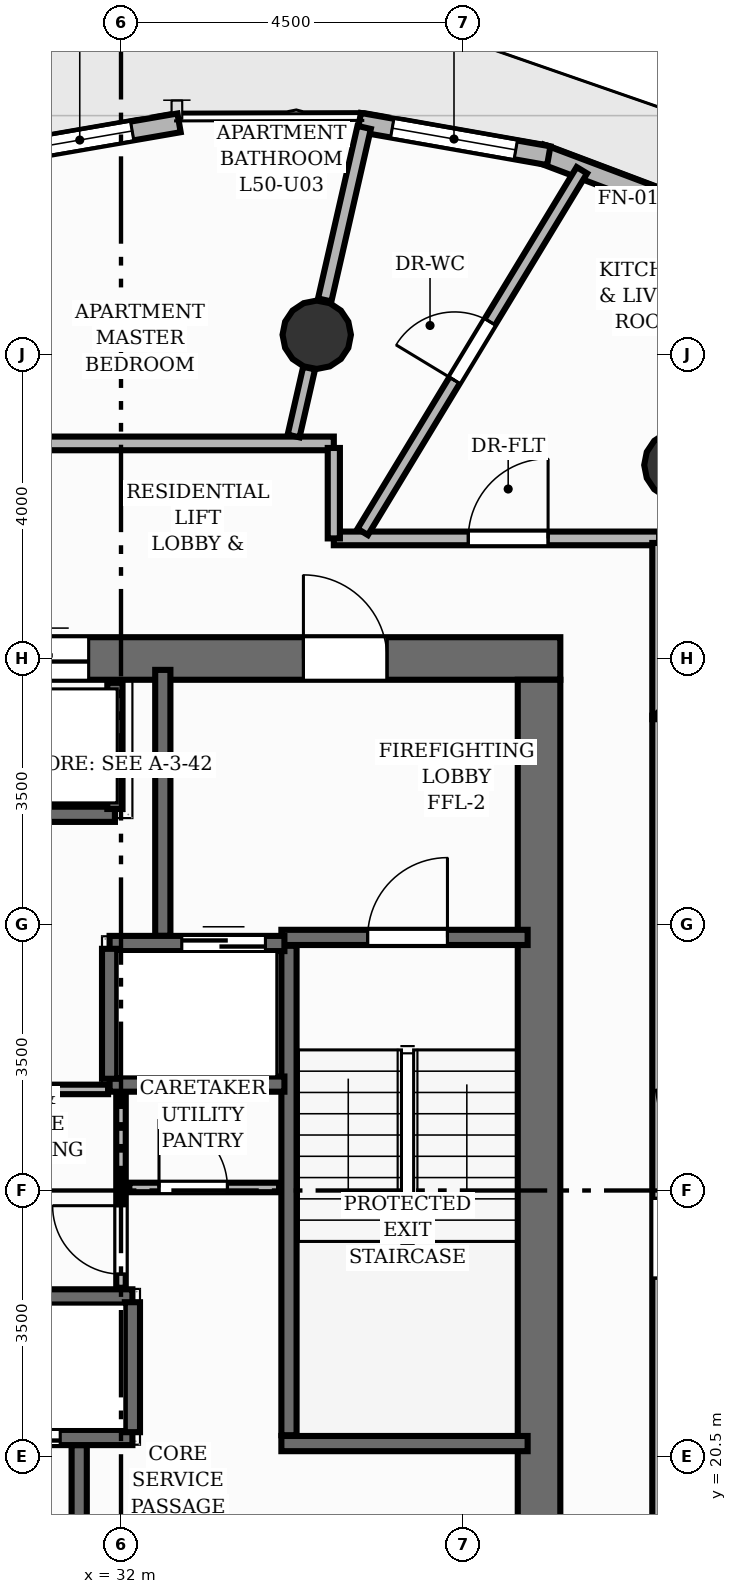
"""IFC4 building model, lengths in metres.
Left out: names, types, materials, properties, quantities, classifications, styles, units other than length and angle.
Written with IfcOpenShell. Run it as: python <this file> out.ifc"""

import sys

from ifc_helpers import new_model, si_unit, direction, frame, frame_2d, origin, origin_2d, place, context, subcontext, project, spatial, rectangle, circle, extrude, element, fill, save


model = new_model("IFC4")
c1 = context("Model", 3, precision=1e-05, world=origin(), true_north=direction((0.0, 1.0)))
c2 = subcontext(c1, "Body", "Model", "MODEL_VIEW")
j1 = project(units=[si_unit("LENGTHUNIT", "METRE"), si_unit("PLANEANGLEUNIT", "RADIAN")], contexts=[c1])
p1 = place(None, origin())
s1 = spatial("IfcSite", under=j1, at=p1, CompositionType="ELEMENT")
p2 = place(p1, origin())
s2 = spatial("IfcBuilding", under=s1, at=p2, CompositionType="ELEMENT")
p3 = place(p2, frame((0.0, 0.0, 169.44)))
s3 = spatial("IfcBuildingStorey", under=s2, at=p3, CompositionType="ELEMENT", Elevation=169.44)
p4 = place(p3, frame((26.22, 31.0, 0.0), z_axis=(0.0, 0.0, 1.0), x_axis=(1.0, 0.0, 0.0)))
e1 = element("IfcWall", 1, at=p4, inside=s3, PredefinedType="SHEAR", context=c2, shape_type="SweptSolid", body=[
    extrude(rectangle(XDim=11.56, YDim=0.56, at=frame_2d((5.78, 0.0))), origin(), (0.0, 0.0, 1.0), 3.2),
])
p5 = place(p4, frame((8.18, 0.0, 0.0)))
e2 = element("IfcOpeningElement", 2, at=p5, cuts=e1, PredefinedType="OPENING", context=c2, shape_type="SweptSolid", body=[
    extrude(rectangle(XDim=1.1, YDim=2.15, at=frame_2d((0.55, 1.075))), frame((0.0, 0.29, 0.0), z_axis=(0.0, -1.0, 0.0), x_axis=(1.0, 0.0, 0.0)), (0.0, 0.0, 1.0), 0.58),
])
p6 = place(p4, frame((0.805, 0.0, 0.0)))
e3 = element("IfcOpeningElement", 3, at=p6, cuts=e1, PredefinedType="OPENING", context=c2, shape_type="SweptSolid", body=[
    extrude(rectangle(XDim=1.05, YDim=2.15, at=frame_2d((0.525, 1.075))), frame((0.0, 0.29, 0.0), z_axis=(0.0, -1.0, 0.0), x_axis=(1.0, 0.0, 0.0)), (0.0, 0.0, 1.0), 0.58),
])
p7 = place(p4, frame((2.555, 0.0, 0.0)))
e4 = element("IfcOpeningElement", 4, at=p7, cuts=e1, PredefinedType="OPENING", context=c2, shape_type="SweptSolid", body=[
    extrude(rectangle(XDim=1.05, YDim=2.15, at=frame_2d((0.525, 1.075))), frame((0.0, 0.29, 0.0), z_axis=(0.0, -1.0, 0.0), x_axis=(1.0, 0.0, 0.0)), (0.0, 0.0, 1.0), 0.58),
])
p8 = place(p4, frame((4.305, 0.0, 0.0)))
e5 = element("IfcOpeningElement", 5, at=p8, cuts=e1, PredefinedType="OPENING", context=c2, shape_type="SweptSolid", body=[
    extrude(rectangle(XDim=1.05, YDim=2.15, at=frame_2d((0.525, 1.075))), frame((0.0, 0.29, 0.0), z_axis=(0.0, -1.0, 0.0), x_axis=(1.0, 0.0, 0.0)), (0.0, 0.0, 1.0), 0.58),
])
p9 = place(p3, frame((37.5, 17.28, 0.0), z_axis=(0.0, 0.0, 1.0), x_axis=(0.0, 1.0, 0.0)))
e6 = element("IfcWall", 6, at=p9, inside=s3, PredefinedType="SHEAR", context=c2, shape_type="SweptSolid", body=[
    extrude(rectangle(XDim=13.44, YDim=0.56, at=frame_2d((6.72, 0.0))), origin(), (0.0, 0.0, 1.0), 3.2),
])
for number, where, z_axis, x_axis in (
    (7, (39.333, 33.545, 0.0), (0.0, 0.0, 1.0), (1.0, 0.0, 0.0)),
    (8, (34.575, 35.26, 0.0), (0.0, 0.0, 1.0), (1.0, 0.0, 0.0)),
):
    element("IfcColumn", number, at=place(p3, frame(where, z_axis=z_axis, x_axis=x_axis)), inside=s3, PredefinedType="COLUMN", context=c2, shape_type="SweptSolid", body=[
        extrude(circle(Radius=0.45, at=origin_2d()), origin(), (0.0, 0.0, 1.0), 3.2),
    ])
p10 = place(p3, frame((37.519, 37.645, 0.0), z_axis=(0.0, 0.0, 1.0), x_axis=(0.93586674787, -0.352354126172, 0.0)))
e9 = element("IfcWall", 9, at=p10, inside=s3, PredefinedType="SOLIDWALL", context=c2, shape_type="SweptSolid", body=[
    extrude(rectangle(XDim=2.478, YDim=0.25, at=frame_2d((1.239, 0.0))), origin(), (0.0, 0.0, 1.0), 2.96),
])
p11 = place(p3, frame((35.135, 38.055, 0.0), z_axis=(0.0, 0.0, 1.0), x_axis=(0.984837873762, -0.173477267688, 0.0)))
e10 = element("IfcWall", 10, at=p11, inside=s3, PredefinedType="SOLIDWALL", context=c2, shape_type="SweptSolid", body=[
    extrude(rectangle(XDim=2.532, YDim=0.25, at=frame_2d((1.266, 0.0))), origin(), (0.0, 0.0, 1.0), 2.96),
])
p12 = place(p11, frame((0.441, 0.0, 0.85)))
e11 = element("IfcOpeningElement", 11, at=p12, cuts=e10, PredefinedType="OPENING", context=c2, shape_type="SweptSolid", body=[
    extrude(rectangle(XDim=1.65, YDim=1.55, at=frame_2d((0.825, 0.775))), frame((0.0, 0.135, 0.0), z_axis=(0.0, -1.0, 0.0), x_axis=(1.0, 0.0, 0.0)), (0.0, 0.0, 1.0), 0.27),
])
p13 = place(p3, frame((30.152, 37.595, 0.0), z_axis=(0.0, 0.0, 1.0), x_axis=(0.985331154473, 0.170653203967, 0.0)))
e12 = element("IfcWall", 12, at=p13, inside=s3, PredefinedType="SOLIDWALL", context=c2, shape_type="SweptSolid", body=[
    extrude(rectangle(XDim=2.651, YDim=0.25, at=frame_2d((1.325, 0.0))), origin(), (0.0, 0.0, 1.0), 2.96),
])
p14 = place(p13, frame((0.625, 0.0, 0.85)))
e13 = element("IfcOpeningElement", 13, at=p14, cuts=e12, PredefinedType="OPENING", context=c2, shape_type="SweptSolid", body=[
    extrude(rectangle(XDim=1.4, YDim=1.55, at=frame_2d((0.7, 0.775))), frame((0.0, 0.135, 0.0), z_axis=(0.0, -1.0, 0.0), x_axis=(1.0, 0.0, 0.0)), (0.0, 0.0, 1.0), 0.27),
])
p15 = place(p3, frame((34.21, 20.78, 0.0), z_axis=(0.0, 0.0, 1.0), x_axis=(0.0, 1.0, 0.0)))
e14 = element("IfcWall", 14, at=p15, inside=s3, PredefinedType="SHEAR", context=c2, shape_type="SweptSolid", body=[
    extrude(rectangle(XDim=6.44, YDim=0.2, at=frame_2d((3.22, 0.0))), origin(), (0.0, 0.0, 1.0), 3.2),
])
p16 = place(p3, frame((34.11, 20.67, 0.0), z_axis=(0.0, 0.0, 1.0), x_axis=(1.0, 0.0, 0.0)))
e15 = element("IfcWall", 15, at=p16, inside=s3, PredefinedType="SHEAR", context=c2, shape_type="SweptSolid", body=[
    extrude(rectangle(XDim=3.24, YDim=0.2, at=frame_2d((1.62, 0.0))), origin(), (0.0, 0.0, 1.0), 3.2),
])
p17 = place(p3, frame((34.11, 27.33, 0.0), z_axis=(0.0, 0.0, 1.0), x_axis=(1.0, 0.0, 0.0)))
e16 = element("IfcWall", 16, at=p17, inside=s3, PredefinedType="SHEAR", context=c2, shape_type="SweptSolid", body=[
    extrude(rectangle(XDim=3.24, YDim=0.2, at=frame_2d((1.62, 0.0))), origin(), (0.0, 0.0, 1.0), 3.2),
])
p18 = place(p17, frame((1.135, 0.0, 0.0)))
e17 = element("IfcOpeningElement", 17, at=p18, cuts=e16, PredefinedType="OPENING", context=c2, shape_type="SweptSolid", body=[
    extrude(rectangle(XDim=1.05, YDim=2.15, at=frame_2d((0.525, 1.075))), frame((0.0, 0.11, 0.0), z_axis=(0.0, -1.0, 0.0), x_axis=(1.0, 0.0, 0.0)), (0.0, 0.0, 1.0), 0.22),
])
for number, where, z_axis, x_axis in (
    (18, (31.45, 17.15, 0.0), (0.0, 0.0, 1.0), (0.0, 1.0, 0.0)),
    (19, (32.55, 27.35, 0.0), (0.0, 0.0, 1.0), (0.0, 1.0, 0.0)),
):
    element("IfcWall", number, at=place(p3, frame(where, z_axis=z_axis, x_axis=x_axis)), inside=s3, PredefinedType="SHEAR", context=c2, shape_type="SweptSolid", body=[
        extrude(rectangle(XDim=3.5, YDim=0.2, at=frame_2d((1.75, 0.0))), origin(), (0.0, 0.0, 1.0), 3.2),
    ])
p19 = place(p3, frame((29.85, 20.75, 0.0), z_axis=(0.0, 0.0, 1.0), x_axis=(1.0, 0.0, 0.0)))
e20 = element("IfcWall", 20, at=p19, inside=s3, PredefinedType="SHEAR", context=c2, shape_type="SweptSolid", body=[
    extrude(rectangle(XDim=2.3, YDim=0.2, at=frame_2d((1.15, 0.0))), origin(), (0.0, 0.0, 1.0), 3.2),
])
p20 = place(p19, frame((0.25, 0.0, 0.0)))
e21 = element("IfcOpeningElement", 21, at=p20, cuts=e20, PredefinedType="OPENING", context=c2, shape_type="SweptSolid", body=[
    extrude(rectangle(XDim=1.1, YDim=2.15, at=frame_2d((0.55, 1.075))), frame((0.0, 0.11, 0.0), z_axis=(0.0, -1.0, 0.0), x_axis=(1.0, 0.0, 0.0)), (0.0, 0.0, 1.0), 0.22),
])
p21 = place(p3, frame((29.85, 22.6, 0.0), z_axis=(0.0, 0.0, 1.0), x_axis=(1.0, 0.0, 0.0)))
e22 = element("IfcWall", 22, at=p21, inside=s3, PredefinedType="SHEAR", context=c2, shape_type="SweptSolid", body=[
    extrude(rectangle(XDim=2.3, YDim=0.2, at=frame_2d((1.15, 0.0))), origin(), (0.0, 0.0, 1.0), 3.2),
])
p22 = place(p3, frame((32.15, 20.82, 0.0), z_axis=(0.0, 0.0, 1.0), x_axis=(0.0, 1.0, 0.0)))
e23 = element("IfcWall", 23, at=p22, inside=s3, PredefinedType="SHEAR", context=c2, shape_type="SweptSolid", body=[
    extrude(rectangle(XDim=1.71, YDim=0.2, at=frame_2d((0.855, 0.0))), origin(), (0.0, 0.0, 1.0), 3.2),
])
p23 = place(p3, frame((31.85, 27.25, 0.0), z_axis=(0.0, 0.0, 1.0), x_axis=(1.0, 0.0, 0.0)))
e24 = element("IfcWall", 24, at=p23, inside=s3, PredefinedType="SHEAR", context=c2, shape_type="SweptSolid", body=[
    extrude(rectangle(XDim=2.3, YDim=0.2, at=frame_2d((1.15, 0.0))), origin(), (0.0, 0.0, 1.0), 3.2),
])
p24 = place(p23, frame((0.95, 0.0, 0.0)))
e25 = element("IfcOpeningElement", 25, at=p24, cuts=e24, PredefinedType="OPENING", context=c2, shape_type="SweptSolid", body=[
    extrude(rectangle(XDim=1.1, YDim=2.15, at=frame_2d((0.55, 1.075))), frame((0.0, 0.11, 0.0), z_axis=(0.0, -1.0, 0.0), x_axis=(1.0, 0.0, 0.0)), (0.0, 0.0, 1.0), 0.22),
])
p25 = place(p3, frame((31.85, 25.4, 0.0), z_axis=(0.0, 0.0, 1.0), x_axis=(1.0, 0.0, 0.0)))
e26 = element("IfcWall", 26, at=p25, inside=s3, PredefinedType="SHEAR", context=c2, shape_type="SweptSolid", body=[
    extrude(rectangle(XDim=2.3, YDim=0.2, at=frame_2d((1.15, 0.0))), origin(), (0.0, 0.0, 1.0), 3.2),
])
p26 = place(p3, frame((31.85, 25.47, 0.0), z_axis=(0.0, 0.0, 1.0), x_axis=(0.0, 1.0, 0.0)))
e27 = element("IfcWall", 27, at=p26, inside=s3, PredefinedType="SHEAR", context=c2, shape_type="SweptSolid", body=[
    extrude(rectangle(XDim=1.71, YDim=0.2, at=frame_2d((0.855, 0.0))), origin(), (0.0, 0.0, 1.0), 3.2),
])
p27 = place(p3, frame((26.68, 28.95, 0.0), z_axis=(0.0, 0.0, 1.0), x_axis=(1.0, 0.0, 0.0)))
e28 = element("IfcWall", 28, at=p27, inside=s3, PredefinedType="SHEAR", context=c2, shape_type="SweptSolid", body=[
    extrude(rectangle(XDim=5.24, YDim=0.2, at=frame_2d((2.62, 0.0))), origin(), (0.0, 0.0, 1.0), 3.2),
])
p28 = place(p3, frame((31.92, 29.02, 0.0), z_axis=(0.0, 0.0, 1.0), x_axis=(0.0, 1.0, 0.0)))
e29 = element("IfcWall", 29, at=p28, inside=s3, PredefinedType="SHEAR", context=c2, shape_type="SweptSolid", body=[
    extrude(rectangle(XDim=1.66, YDim=0.2, at=frame_2d((0.83, 0.0))), origin(), (0.0, 0.0, 1.0), 3.2),
])
p29 = place(p3, frame((32.0, 22.72, 0.0), z_axis=(0.0, 0.0, 1.0), x_axis=(0.0, 1.0, 0.0)))
e30 = element("IfcWall", 30, at=p29, inside=s3, PredefinedType="PARTITIONING", context=c2, shape_type="SweptSolid", body=[
    extrude(rectangle(XDim=2.52, YDim=0.125, at=frame_2d((1.26, 0.0))), origin(), (0.0, 0.0, 1.0), 2.955),
])
p30 = place(p29, frame((0.18, 0.0, 0.0)))
e31 = element("IfcOpeningElement", 31, at=p30, cuts=e30, PredefinedType="OPENING", context=c2, shape_type="SweptSolid", body=[
    extrude(rectangle(XDim=0.9, YDim=2.1, at=frame_2d((0.45, 1.05))), frame((0.0, 0.073, 0.0), z_axis=(0.0, -1.0, 0.0), x_axis=(1.0, 0.0, 0.0)), (0.0, 0.0, 1.0), 0.145),
])
p31 = place(p3, frame((32.11, 24.04, 0.0), z_axis=(0.0, 0.0, 1.0), x_axis=(1.0, 0.0, 0.0)))
e32 = element("IfcWall", 32, at=p31, inside=s3, PredefinedType="PARTITIONING", context=c2, shape_type="SweptSolid", body=[
    extrude(rectangle(XDim=1.97, YDim=0.125, at=frame_2d((0.985, 0.0))), origin(), (0.0, 0.0, 1.0), 2.955),
])
p32 = place(p31, frame((0.39, 0.0, 0.0)))
e33 = element("IfcOpeningElement", 33, at=p32, cuts=e32, PredefinedType="OPENING", context=c2, shape_type="SweptSolid", body=[
    extrude(rectangle(XDim=0.9, YDim=2.1, at=frame_2d((0.45, 1.05))), frame((0.0, 0.073, 0.0), z_axis=(0.0, -1.0, 0.0), x_axis=(1.0, 0.0, 0.0)), (0.0, 0.0, 1.0), 0.145),
])
p33 = place(p3, frame((29.89, 25.33, 0.0), z_axis=(0.0, 0.0, 1.0), x_axis=(1.0, 0.0, 0.0)))
e34 = element("IfcWall", 34, at=p33, inside=s3, PredefinedType="PARTITIONING", context=c2, shape_type="SweptSolid", body=[
    extrude(rectangle(XDim=1.94, YDim=0.125, at=frame_2d((0.97, 0.0))), origin(), (0.0, 0.0, 1.0), 2.955),
])
p34 = place(p3, frame((34.68, 35.718, 0.0), z_axis=(0.0, 0.0, 1.0), x_axis=(0.222998449778, 0.974818799263, 0.0)))
e35 = element("IfcWall", 35, at=p34, inside=s3, PredefinedType="PARTITIONING", context=c2, shape_type="SweptSolid", body=[
    extrude(rectangle(XDim=2.329, YDim=0.18, at=frame_2d((1.164, 0.0))), origin(), (0.0, 0.0, 1.0), 2.404),
])
p35 = place(p3, frame((39.08, 30.248, 0.0), z_axis=(0.0, 0.0, 1.0), x_axis=(0.0, -1.0, 0.0)))
e36 = element("IfcWall", 36, at=p35, inside=s3, PredefinedType="PARTITIONING", context=c2, shape_type="SweptSolid", body=[
    extrude(rectangle(XDim=14.828, YDim=0.18, at=frame_2d((7.414, 0.0))), origin(), (0.0, 0.0, 1.0), 2.955),
])
p36 = place(p35, frame((6.351, 0.0, 0.0)))
e37 = element("IfcOpeningElement", 37, at=p36, cuts=e36, PredefinedType="OPENING", context=c2, shape_type="SweptSolid", body=[
    extrude(rectangle(XDim=1.05, YDim=2.15, at=frame_2d((0.525, 1.075))), frame((0.0, 0.1, 0.0), z_axis=(0.0, -1.0, 0.0), x_axis=(1.0, 0.0, 0.0)), (0.0, 0.0, 1.0), 0.2),
])
p37 = place(p3, frame((34.8, 32.58, 0.0), z_axis=(0.0, 0.0, 1.0), x_axis=(1.0, 0.0, 0.0)))
e38 = element("IfcWall", 38, at=p37, inside=s3, PredefinedType="PARTITIONING", context=c2, shape_type="SweptSolid", body=[
    extrude(rectangle(XDim=4.28, YDim=0.18, at=frame_2d((2.14, 0.0))), origin(), (0.0, 0.0, 1.0), 2.955),
])
p38 = place(p37, frame((1.769, 0.0, 0.0)))
e39 = element("IfcOpeningElement", 39, at=p38, cuts=e38, PredefinedType="OPENING", context=c2, shape_type="SweptSolid", body=[
    extrude(rectangle(XDim=1.05, YDim=2.15, at=frame_2d((0.525, 1.075))), frame((0.0, 0.1, 0.0), z_axis=(0.0, -1.0, 0.0), x_axis=(1.0, 0.0, 0.0)), (0.0, 0.0, 1.0), 0.2),
])
p39 = place(p3, frame((39.08, 32.52, 0.0), z_axis=(0.0, 0.0, 1.0), x_axis=(0.0, -1.0, 0.0)))
e40 = element("IfcWall", 40, at=p39, inside=s3, PredefinedType="PARTITIONING", context=c2, shape_type="SweptSolid", body=[
    extrude(rectangle(XDim=2.319, YDim=0.18, at=frame_2d((1.159, 0.0))), origin(), (0.0, 0.0, 1.0), 2.955),
])
p40 = place(p3, frame((29.2, 33.83, 0.0), z_axis=(0.0, 0.0, 1.0), x_axis=(1.0, 0.0, 0.0)))
e41 = element("IfcWall", 41, at=p40, inside=s3, PredefinedType="PARTITIONING", context=c2, shape_type="SweptSolid", body=[
    extrude(rectangle(XDim=5.6, YDim=0.18, at=frame_2d((2.8, 0.0))), origin(), (0.0, 0.0, 1.0), 2.955),
])
p41 = place(p3, frame((34.8, 33.77, 0.0), z_axis=(0.0, 0.0, 1.0), x_axis=(0.0, -1.0, 0.0)))
e42 = element("IfcWall", 42, at=p41, inside=s3, PredefinedType="PLUMBINGWALL", context=c2, shape_type="SweptSolid", body=[
    extrude(rectangle(XDim=1.19, YDim=0.16, at=frame_2d((0.595, 0.0))), origin(), (0.0, 0.0, 1.0), 2.955),
])
p42 = place(p3, frame((35.18, 32.666, 0.0), z_axis=(0.0, 0.0, 1.0), x_axis=(0.518194743754, 0.855262654128, 0.0)))
e43 = element("IfcWall", 43, at=p42, inside=s3, PredefinedType="PLUMBINGWALL", context=c2, shape_type="SweptSolid", body=[
    extrude(rectangle(XDim=5.564, YDim=0.16, at=frame_2d((2.782, 0.0))), origin(), (0.0, 0.0, 1.0), 2.692),
])
p43 = place(p42, frame((2.332, 0.0, 0.0)))
e44 = element("IfcOpeningElement", 44, at=p43, cuts=e43, PredefinedType="OPENING", context=c2, shape_type="SweptSolid", body=[
    extrude(rectangle(XDim=0.9, YDim=2.1, at=frame_2d((0.45, 1.05))), frame((0.0, 0.09, 0.0), z_axis=(0.0, -1.0, 0.0), x_axis=(1.0, 0.0, 0.0)), (0.0, 0.0, 1.0), 0.18),
])
p44 = place(p3, frame((43.4, 34.017, 0.0), z_axis=(0.0, 0.0, 1.0), x_axis=(-0.751212741732, -0.660060161394, 0.0)))
e45 = element("IfcWall", 45, at=p44, inside=s3, PredefinedType="PARTITIONING", context=c2, shape_type="SweptSolid", body=[
    extrude(rectangle(XDim=5.75, YDim=0.125, at=frame_2d((2.875, 0.0))), origin(), (0.0, 0.0, 1.0), 2.955),
])
p45 = place(p44, frame((1.141, 0.0, 0.0)))
e46 = element("IfcOpeningElement", 46, at=p45, cuts=e45, PredefinedType="OPENING", context=c2, shape_type="SweptSolid", body=[
    extrude(rectangle(XDim=0.9, YDim=2.1, at=frame_2d((0.45, 1.05))), frame((0.0, 0.073, 0.0), z_axis=(0.0, -1.0, 0.0), x_axis=(1.0, 0.0, 0.0)), (0.0, 0.0, 1.0), 0.145),
])
p46 = place(p44, frame((3.856, 0.0, 0.0)))
e47 = element("IfcOpeningElement", 47, at=p46, cuts=e45, PredefinedType="OPENING", context=c2, shape_type="SweptSolid", body=[
    extrude(rectangle(XDim=0.9, YDim=2.1, at=frame_2d((0.45, 1.05))), frame((0.0, 0.073, 0.0), z_axis=(0.0, -1.0, 0.0), x_axis=(1.0, 0.0, 0.0)), (0.0, 0.0, 1.0), 0.145),
])
p47 = place(p3, frame((34.271, 33.927, 0.0), z_axis=(0.0, 0.0, 1.0), x_axis=(0.222991179816, 0.974820462303, 0.0)))
e48 = element("IfcWall", 48, at=p47, inside=s3, PredefinedType="PLUMBINGWALL", context=c2, shape_type="SweptSolid", body=[
    extrude(rectangle(XDim=0.917, YDim=0.16, at=frame_2d((0.458, 0.0))), origin(), (0.0, 0.0, 1.0), 2.404),
])
p48 = place(p12, origin())
e49 = element("IfcWindow", 49, at=p48, inside=s3, PartitioningType="SINGLE_PANEL", PredefinedType="WINDOW", context=c2, shape_type="SweptSolid", body=[
    extrude(rectangle(XDim=1.65, YDim=1.55, at=frame_2d((0.825, 0.775))), frame((0.0, 0.03, 0.0), z_axis=(0.0, -1.0, 0.0), x_axis=(1.0, 0.0, 0.0)), (0.0, 0.0, 1.0), 0.06),
])
fill(e11, e49)
p49 = place(p14, origin())
e50 = element("IfcWindow", 50, at=p49, inside=s3, PartitioningType="SINGLE_PANEL", PredefinedType="WINDOW", context=c2, shape_type="SweptSolid", body=[
    extrude(rectangle(XDim=1.4, YDim=1.55, at=frame_2d((0.7, 0.775))), frame((0.0, 0.03, 0.0), z_axis=(0.0, -1.0, 0.0), x_axis=(1.0, 0.0, 0.0)), (0.0, 0.0, 1.0), 0.06),
])
fill(e13, e50)
p50 = place(p18, origin())
e51 = element("IfcDoor", 51, at=p50, inside=s3, OperationType="SINGLE_SWING_RIGHT", PredefinedType="DOOR", context=c2, shape_type="SweptSolid", body=[
    extrude(rectangle(XDim=1.05, YDim=2.15, at=frame_2d((0.525, 1.075))), frame((0.0, 0.025, 0.0), z_axis=(0.0, -1.0, 0.0), x_axis=(1.0, 0.0, 0.0)), (0.0, 0.0, 1.0), 0.05),
])
fill(e17, e51)
p51 = place(p5, origin())
e52 = element("IfcDoor", 52, at=p51, inside=s3, OperationType="SINGLE_SWING_LEFT", PredefinedType="DOOR", context=c2, shape_type="SweptSolid", body=[
    extrude(rectangle(XDim=1.1, YDim=2.15, at=frame_2d((0.55, 1.075))), frame((0.0, 0.025, 0.0), z_axis=(0.0, -1.0, 0.0), x_axis=(1.0, 0.0, 0.0)), (0.0, 0.0, 1.0), 0.05),
])
fill(e2, e52)
p52 = place(p20, origin())
e53 = element("IfcDoor", 53, at=p52, inside=s3, OperationType="DOUBLE_DOOR_SLIDING", PredefinedType="DOOR", context=c2, shape_type="SweptSolid", body=[
    extrude(rectangle(XDim=1.1, YDim=2.15, at=frame_2d((0.55, 1.075))), frame((0.0, 0.025, 0.0), z_axis=(0.0, -1.0, 0.0), x_axis=(1.0, 0.0, 0.0)), (0.0, 0.0, 1.0), 0.05),
])
fill(e21, e53)
p53 = place(p24, origin())
e54 = element("IfcDoor", 54, at=p53, inside=s3, OperationType="DOUBLE_DOOR_SLIDING", PredefinedType="DOOR", context=c2, shape_type="SweptSolid", body=[
    extrude(rectangle(XDim=1.1, YDim=2.15, at=frame_2d((0.55, 1.075))), frame((0.0, 0.025, 0.0), z_axis=(0.0, -1.0, 0.0), x_axis=(1.0, 0.0, 0.0)), (0.0, 0.0, 1.0), 0.05),
])
fill(e25, e54)
p54 = place(p8, origin())
e55 = element("IfcDoor", 55, at=p54, inside=s3, OperationType="DOUBLE_DOOR_SLIDING", PredefinedType="DOOR", context=c2, shape_type="SweptSolid", body=[
    extrude(rectangle(XDim=1.05, YDim=2.15, at=frame_2d((0.525, 1.075))), frame((0.0, 0.025, 0.0), z_axis=(0.0, -1.0, 0.0), x_axis=(1.0, 0.0, 0.0)), (0.0, 0.0, 1.0), 0.05),
])
fill(e5, e55)
p55 = place(p32, origin())
e56 = element("IfcDoor", 56, at=p55, inside=s3, OperationType="SINGLE_SWING_LEFT", PredefinedType="DOOR", context=c2, shape_type="SweptSolid", body=[
    extrude(rectangle(XDim=0.9, YDim=2.1, at=frame_2d((0.45, 1.05))), frame((0.0, 0.025, 0.0), z_axis=(0.0, -1.0, 0.0), x_axis=(1.0, 0.0, 0.0)), (0.0, 0.0, 1.0), 0.05),
])
fill(e33, e56)
p56 = place(p30, origin())
e57 = element("IfcDoor", 57, at=p56, inside=s3, OperationType="SINGLE_SWING_RIGHT", PredefinedType="DOOR", context=c2, shape_type="SweptSolid", body=[
    extrude(rectangle(XDim=0.9, YDim=2.1, at=frame_2d((0.45, 1.05))), frame((0.0, 0.025, 0.0), z_axis=(0.0, -1.0, 0.0), x_axis=(1.0, 0.0, 0.0)), (0.0, 0.0, 1.0), 0.05),
])
fill(e31, e57)
p57 = place(p36, origin())
e58 = element("IfcDoor", 58, at=p57, inside=s3, OperationType="SINGLE_SWING_LEFT", PredefinedType="DOOR", context=c2, shape_type="SweptSolid", body=[
    extrude(rectangle(XDim=1.05, YDim=2.15, at=frame_2d((0.525, 1.075))), frame((0.0, 0.025, 0.0), z_axis=(0.0, -1.0, 0.0), x_axis=(1.0, 0.0, 0.0)), (0.0, 0.0, 1.0), 0.05),
])
fill(e37, e58)
p58 = place(p38, origin())
e59 = element("IfcDoor", 59, at=p58, inside=s3, OperationType="SINGLE_SWING_RIGHT", PredefinedType="DOOR", context=c2, shape_type="SweptSolid", body=[
    extrude(rectangle(XDim=1.05, YDim=2.15, at=frame_2d((0.525, 1.075))), frame((0.0, 0.025, 0.0), z_axis=(0.0, -1.0, 0.0), x_axis=(1.0, 0.0, 0.0)), (0.0, 0.0, 1.0), 0.05),
])
fill(e39, e59)
p59 = place(p43, origin())
e60 = element("IfcDoor", 60, at=p59, inside=s3, OperationType="SINGLE_SWING_LEFT", PredefinedType="DOOR", context=c2, shape_type="SweptSolid", body=[
    extrude(rectangle(XDim=0.9, YDim=2.1, at=frame_2d((0.45, 1.05))), frame((0.0, 0.025, 0.0), z_axis=(0.0, -1.0, 0.0), x_axis=(1.0, 0.0, 0.0)), (0.0, 0.0, 1.0), 0.05),
])
fill(e44, e60)
save(model, sys.argv[1])
